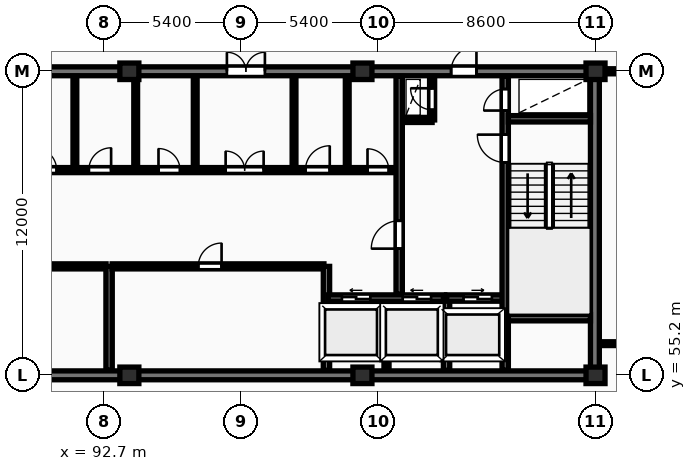
"""IFC4 building model, lengths in metres.
Left out: names, types, materials, properties, quantities, classifications, styles, units other than length and angle.
Written with IfcOpenShell. Run it as: python <this file> out.ifc"""

import sys

from ifc_helpers import new_model, si_unit, direction, frame, frame_2d, origin, origin_2d, place, context, subcontext, project, spatial, rectangle, extrude, element, fill, save


model = new_model("IFC4")
c1 = context("Model", 3, precision=1e-05, world=origin(), true_north=direction((0.0, 1.0)))
c2 = subcontext(c1, "Body", "Model", "MODEL_VIEW")
j1 = project(units=[si_unit("LENGTHUNIT", "METRE"), si_unit("PLANEANGLEUNIT", "RADIAN")], contexts=[c1])
p1 = place(None, origin())
s1 = spatial("IfcSite", under=j1, at=p1, CompositionType="ELEMENT")
p2 = place(p1, origin())
s2 = spatial("IfcBuilding", under=s1, at=p2, CompositionType="ELEMENT")
p3 = place(p2, frame((0.0, 0.0, 242.45)))
s3 = spatial("IfcBuildingStorey", under=s2, at=p3, CompositionType="ELEMENT", Elevation=242.45)
for number, where, z_axis, x_axis in (
    (1, (93.7, 55.2, 0.0), (0.0, 0.0, 1.0), (1.0, 0.0, 0.0)),
    (2, (93.7, 67.2, 0.0), (0.0, 0.0, 1.0), (1.0, 0.0, 0.0)),
    (3, (102.9, 55.2, 0.0), (0.0, 0.0, 1.0), (1.0, 0.0, 0.0)),
    (4, (102.9, 67.2, 0.0), (0.0, 0.0, 1.0), (1.0, 0.0, 0.0)),
    (5, (112.1, 55.2, 0.0), (0.0, 0.0, 1.0), (1.0, 0.0, 0.0)),
    (6, (112.1, 67.2, 0.0), (0.0, 0.0, 1.0), (1.0, 0.0, 0.0)),
):
    element("IfcColumn", number, at=place(p3, frame(where, z_axis=z_axis, x_axis=x_axis)), inside=s3, PredefinedType="COLUMN", context=c2, shape_type="SweptSolid", body=[
        extrude(rectangle(XDim=0.75, YDim=0.65, at=origin_2d()), origin(), (0.0, 0.0, 1.0), 3.45),
    ])
p4 = place(p3, frame((75.95, 55.2, 0.0), z_axis=(0.0, 0.0, 1.0), x_axis=(1.0, 0.0, 0.0)))
e7 = element("IfcWall", 7, at=p4, inside=s3, PredefinedType="SHEAR", context=c2, shape_type="SweptSolid", body=[
    extrude(rectangle(XDim=36.3, YDim=0.35, at=frame_2d((18.15, 0.0))), origin(), (0.0, 0.0, 1.0), 3.45),
])
p5 = place(p3, frame((112.075, 55.375, 0.0), z_axis=(0.0, 0.0, 1.0), x_axis=(0.0, 1.0, 0.0)))
e8 = element("IfcWall", 8, at=p5, inside=s3, PredefinedType="SHEAR", context=c2, shape_type="SweptSolid", body=[
    extrude(rectangle(XDim=11.65, YDim=0.35, at=frame_2d((5.825, 0.0))), origin(), (0.0, 0.0, 1.0), 3.45),
])
p6 = place(p3, frame((75.95, 67.2, 0.0), z_axis=(0.0, 0.0, 1.0), x_axis=(1.0, 0.0, 0.0)))
e9 = element("IfcWall", 9, at=p6, inside=s3, PredefinedType="SHEAR", context=c2, shape_type="SweptSolid", body=[
    extrude(rectangle(XDim=36.3, YDim=0.35, at=frame_2d((18.15, 0.0))), origin(), (0.0, 0.0, 1.0), 3.45),
])
p7 = place(p6, frame((5.25, 0.0, 0.0)))
e10 = element("IfcOpeningElement", 10, at=p7, cuts=e9, PredefinedType="OPENING", context=c2, shape_type="SweptSolid", body=[
    extrude(rectangle(XDim=1.0, YDim=2.15, at=frame_2d((0.5, 1.075))), frame((0.0, 0.185, 0.0), z_axis=(0.0, -1.0, 0.0), x_axis=(1.0, 0.0, 0.0)), (0.0, 0.0, 1.0), 0.37),
])
p8 = place(p6, frame((21.6, 0.0, 0.0)))
e11 = element("IfcOpeningElement", 11, at=p8, cuts=e9, PredefinedType="OPENING", context=c2, shape_type="SweptSolid", body=[
    extrude(rectangle(XDim=1.5, YDim=2.2, at=frame_2d((0.75, 1.1))), frame((0.0, 0.185, 0.0), z_axis=(0.0, -1.0, 0.0), x_axis=(1.0, 0.0, 0.0)), (0.0, 0.0, 1.0), 0.37),
])
p9 = place(p6, frame((30.45, 0.0, 0.0)))
e12 = element("IfcOpeningElement", 12, at=p9, cuts=e9, PredefinedType="OPENING", context=c2, shape_type="SweptSolid", body=[
    extrude(rectangle(XDim=1.0, YDim=2.15, at=frame_2d((0.5, 1.075))), frame((0.0, 0.185, 0.0), z_axis=(0.0, -1.0, 0.0), x_axis=(1.0, 0.0, 0.0)), (0.0, 0.0, 1.0), 0.37),
])
p10 = place(p3, frame((84.42, 59.5, 0.0), z_axis=(0.0, 0.0, 1.0), x_axis=(1.0, 0.0, 0.0)))
e13 = element("IfcWall", 13, at=p10, inside=s3, PredefinedType="PARTITIONING", context=c2, shape_type="SweptSolid", body=[
    extrude(rectangle(XDim=8.36, YDim=0.2, at=frame_2d((4.18, 0.0))), origin(), (0.0, 0.0, 1.0), 3.17),
])
p11 = place(p10, frame((3.4, 0.0, 0.0)))
e14 = element("IfcOpeningElement", 14, at=p11, cuts=e13, PredefinedType="OPENING", context=c2, shape_type="SweptSolid", body=[
    extrude(rectangle(XDim=0.92, YDim=2.08, at=frame_2d((0.46, 1.04))), frame((0.0, 0.11, 0.0), z_axis=(0.0, -1.0, 0.0), x_axis=(1.0, 0.0, 0.0)), (0.0, 0.0, 1.0), 0.22),
])
p12 = place(p3, frame((92.9, 55.4, 0.0), z_axis=(0.0, 0.0, 1.0), x_axis=(0.0, 1.0, 0.0)))
e15 = element("IfcWall", 15, at=p12, inside=s3, PredefinedType="SHEAR", context=c2, shape_type="SweptSolid", body=[
    extrude(rectangle(XDim=4.1, YDim=0.25, at=frame_2d((2.05, 0.0))), origin(), (0.0, 0.0, 1.0), 3.45),
])
p13 = place(p3, frame((93.02, 59.5, 0.0), z_axis=(0.0, 0.0, 1.0), x_axis=(1.0, 0.0, 0.0)))
e16 = element("IfcWall", 16, at=p13, inside=s3, PredefinedType="PARTITIONING", context=c2, shape_type="SweptSolid", body=[
    extrude(rectangle(XDim=8.36, YDim=0.2, at=frame_2d((4.18, 0.0))), origin(), (0.0, 0.0, 1.0), 3.17),
])
p14 = place(p13, frame((3.4, 0.0, 0.0)))
e17 = element("IfcOpeningElement", 17, at=p14, cuts=e16, PredefinedType="OPENING", context=c2, shape_type="SweptSolid", body=[
    extrude(rectangle(XDim=0.92, YDim=2.08, at=frame_2d((0.46, 1.04))), frame((0.0, 0.11, 0.0), z_axis=(0.0, -1.0, 0.0), x_axis=(1.0, 0.0, 0.0)), (0.0, 0.0, 1.0), 0.22),
])
p15 = place(p3, frame((101.48, 55.4, 0.0), z_axis=(0.0, 0.0, 1.0), x_axis=(0.0, 1.0, 0.0)))
e18 = element("IfcWall", 18, at=p15, inside=s3, PredefinedType="SHEAR", context=c2, shape_type="SweptSolid", body=[
    extrude(rectangle(XDim=4.1, YDim=0.25, at=frame_2d((2.05, 0.0))), origin(), (0.0, 0.0, 1.0), 3.45),
])
p16 = place(p3, frame((103.85, 55.4, 0.0), z_axis=(0.0, 0.0, 1.0), x_axis=(0.0, 1.0, 0.0)))
e19 = element("IfcWall", 19, at=p16, inside=s3, PredefinedType="PARTITIONING", context=c2, shape_type="SweptSolid", body=[
    extrude(rectangle(XDim=2.72, YDim=0.2, at=frame_2d((1.36, 0.0))), origin(), (0.0, 0.0, 1.0), 3.17),
])
p17 = place(p3, frame((101.55, 58.25, 0.0), z_axis=(0.0, 0.0, 1.0), x_axis=(1.0, 0.0, 0.0)))
e20 = element("IfcWall", 20, at=p17, inside=s3, PredefinedType="SHEAR", context=c2, shape_type="SweptSolid", body=[
    extrude(rectangle(XDim=4.6, YDim=0.25, at=frame_2d((2.3, 0.0))), origin(), (0.0, 0.0, 1.0), 3.45),
])
p18 = place(p17, frame((0.54, 0.0, 0.0)))
e21 = element("IfcOpeningElement", 21, at=p18, cuts=e20, PredefinedType="OPENING", context=c2, shape_type="SweptSolid", body=[
    extrude(rectangle(XDim=1.12, YDim=2.12, at=frame_2d((0.56, 1.06))), frame((0.0, 0.135, 0.0), z_axis=(0.0, -1.0, 0.0), x_axis=(1.0, 0.0, 0.0)), (0.0, 0.0, 1.0), 0.27),
])
p19 = place(p17, frame((2.94, 0.0, 0.0)))
e22 = element("IfcOpeningElement", 22, at=p19, cuts=e20, PredefinedType="OPENING", context=c2, shape_type="SweptSolid", body=[
    extrude(rectangle(XDim=1.12, YDim=2.12, at=frame_2d((0.56, 1.06))), frame((0.0, 0.135, 0.0), z_axis=(0.0, -1.0, 0.0), x_axis=(1.0, 0.0, 0.0)), (0.0, 0.0, 1.0), 0.27),
])
p20 = place(p3, frame((106.22, 55.4, 0.0), z_axis=(0.0, 0.0, 1.0), x_axis=(0.0, 1.0, 0.0)))
e23 = element("IfcWall", 23, at=p20, inside=s3, PredefinedType="SHEAR", context=c2, shape_type="SweptSolid", body=[
    extrude(rectangle(XDim=2.85, YDim=0.25, at=frame_2d((1.425, 0.0))), origin(), (0.0, 0.0, 1.0), 3.45),
])
p21 = place(p3, frame((106.22, 58.25, 0.0), z_axis=(0.0, 0.0, 1.0), x_axis=(1.0, 0.0, 0.0)))
e24 = element("IfcWall", 24, at=p21, inside=s3, PredefinedType="SHEAR", context=c2, shape_type="SweptSolid", body=[
    extrude(rectangle(XDim=2.46, YDim=0.25, at=frame_2d((1.23, 0.0))), origin(), (0.0, 0.0, 1.0), 3.45),
])
p22 = place(p21, frame((0.67, 0.0, 0.0)))
e25 = element("IfcOpeningElement", 25, at=p22, cuts=e24, PredefinedType="OPENING", context=c2, shape_type="SweptSolid", body=[
    extrude(rectangle(XDim=1.12, YDim=2.12, at=frame_2d((0.56, 1.06))), frame((0.0, 0.135, 0.0), z_axis=(0.0, -1.0, 0.0), x_axis=(1.0, 0.0, 0.0)), (0.0, 0.0, 1.0), 0.27),
])
p23 = place(p3, frame((91.55, 63.4, 0.0), z_axis=(0.0, 0.0, 1.0), x_axis=(0.0, 1.0, 0.0)))
e26 = element("IfcWall", 26, at=p23, inside=s3, PredefinedType="PARTITIONING", context=c2, shape_type="SweptSolid", body=[
    extrude(rectangle(XDim=3.6, YDim=0.15, at=frame_2d((1.8, 0.0))), origin(), (0.0, 0.0, 1.0), 3.17),
])
p24 = place(p3, frame((93.95, 63.4, 0.0), z_axis=(0.0, 0.0, 1.0), x_axis=(0.0, 1.0, 0.0)))
e27 = element("IfcWall", 27, at=p24, inside=s3, PredefinedType="PARTITIONING", context=c2, shape_type="SweptSolid", body=[
    extrude(rectangle(XDim=3.6, YDim=0.15, at=frame_2d((1.8, 0.0))), origin(), (0.0, 0.0, 1.0), 2.477),
])
for number, where, z_axis, x_axis in (
    (28, (102.3, 63.4, 0.0), (0.0, 0.0, 1.0), (0.0, 1.0, 0.0)),
    (29, (96.3, 63.4, 0.0), (0.0, 0.0, 1.0), (0.0, 1.0, 0.0)),
    (30, (100.2, 63.4, 0.0), (0.0, 0.0, 1.0), (0.0, 1.0, 0.0)),
):
    element("IfcWall", number, at=place(p3, frame(where, z_axis=z_axis, x_axis=x_axis)), inside=s3, PredefinedType="PARTITIONING", context=c2, shape_type="SweptSolid", body=[
        extrude(rectangle(XDim=3.6, YDim=0.15, at=frame_2d((1.8, 0.0))), origin(), (0.0, 0.0, 1.0), 3.17),
    ])
p25 = place(p3, frame((84.42, 63.3, 0.0), z_axis=(0.0, 0.0, 1.0), x_axis=(1.0, 0.0, 0.0)))
e31 = element("IfcWall", 31, at=p25, inside=s3, PredefinedType="PARTITIONING", context=c2, shape_type="SweptSolid", body=[
    extrude(rectangle(XDim=19.83, YDim=0.2, at=frame_2d((9.915, 0.0))), origin(), (0.0, 0.0, 1.0), 3.17),
])
p26 = place(p25, frame((1.15, 0.0, 0.0)))
e32 = element("IfcOpeningElement", 32, at=p26, cuts=e31, PredefinedType="OPENING", context=c2, shape_type="SweptSolid", body=[
    extrude(rectangle(XDim=0.85, YDim=2.05, at=frame_2d((0.425, 1.025))), frame((0.0, 0.11, 0.0), z_axis=(0.0, -1.0, 0.0), x_axis=(1.0, 0.0, 0.0)), (0.0, 0.0, 1.0), 0.22),
])
p27 = place(p25, frame((3.25, 0.0, 0.0)))
e33 = element("IfcOpeningElement", 33, at=p27, cuts=e31, PredefinedType="OPENING", context=c2, shape_type="SweptSolid", body=[
    extrude(rectangle(XDim=0.85, YDim=2.05, at=frame_2d((0.425, 1.025))), frame((0.0, 0.11, 0.0), z_axis=(0.0, -1.0, 0.0), x_axis=(1.0, 0.0, 0.0)), (0.0, 0.0, 1.0), 0.22),
])
p28 = place(p25, frame((13.08, 0.0, 0.0)))
e34 = element("IfcOpeningElement", 34, at=p28, cuts=e31, PredefinedType="OPENING", context=c2, shape_type="SweptSolid", body=[
    extrude(rectangle(XDim=1.5, YDim=2.2, at=frame_2d((0.75, 1.1))), frame((0.0, 0.11, 0.0), z_axis=(0.0, -1.0, 0.0), x_axis=(1.0, 0.0, 0.0)), (0.0, 0.0, 1.0), 0.22),
])
p29 = place(p25, frame((5.53, 0.0, 0.0)))
e35 = element("IfcOpeningElement", 35, at=p29, cuts=e31, PredefinedType="OPENING", context=c2, shape_type="SweptSolid", body=[
    extrude(rectangle(XDim=0.88, YDim=2.06, at=frame_2d((0.44, 1.03))), frame((0.0, 0.11, 0.0), z_axis=(0.0, -1.0, 0.0), x_axis=(1.0, 0.0, 0.0)), (0.0, 0.0, 1.0), 0.22),
])
p30 = place(p25, frame((7.68, 0.0, 0.0)))
e36 = element("IfcOpeningElement", 36, at=p30, cuts=e31, PredefinedType="OPENING", context=c2, shape_type="SweptSolid", body=[
    extrude(rectangle(XDim=0.88, YDim=2.06, at=frame_2d((0.44, 1.03))), frame((0.0, 0.11, 0.0), z_axis=(0.0, -1.0, 0.0), x_axis=(1.0, 0.0, 0.0)), (0.0, 0.0, 1.0), 0.22),
])
p31 = place(p25, frame((10.43, 0.0, 0.0)))
e37 = element("IfcOpeningElement", 37, at=p31, cuts=e31, PredefinedType="OPENING", context=c2, shape_type="SweptSolid", body=[
    extrude(rectangle(XDim=0.85, YDim=2.05, at=frame_2d((0.425, 1.025))), frame((0.0, 0.11, 0.0), z_axis=(0.0, -1.0, 0.0), x_axis=(1.0, 0.0, 0.0)), (0.0, 0.0, 1.0), 0.22),
])
p32 = place(p25, frame((16.23, 0.0, 0.0)))
e38 = element("IfcOpeningElement", 38, at=p32, cuts=e31, PredefinedType="OPENING", context=c2, shape_type="SweptSolid", body=[
    extrude(rectangle(XDim=0.96, YDim=2.1, at=frame_2d((0.48, 1.05))), frame((0.0, 0.11, 0.0), z_axis=(0.0, -1.0, 0.0), x_axis=(1.0, 0.0, 0.0)), (0.0, 0.0, 1.0), 0.22),
])
p33 = place(p25, frame((18.68, 0.0, 0.0)))
e39 = element("IfcOpeningElement", 39, at=p33, cuts=e31, PredefinedType="OPENING", context=c2, shape_type="SweptSolid", body=[
    extrude(rectangle(XDim=0.84, YDim=2.04, at=frame_2d((0.42, 1.02))), frame((0.0, 0.11, 0.0), z_axis=(0.0, -1.0, 0.0), x_axis=(1.0, 0.0, 0.0)), (0.0, 0.0, 1.0), 0.22),
])
p34 = place(p3, frame((104.45, 65.28, 0.0), z_axis=(0.0, 0.0, 1.0), x_axis=(1.0, 0.0, 0.0)))
e40 = element("IfcWall", 40, at=p34, inside=s3, PredefinedType="PARTITIONING", context=c2, shape_type="SweptSolid", body=[
    extrude(rectangle(XDim=1.2, YDim=0.2, at=frame_2d((0.6, 0.0))), origin(), (0.0, 0.0, 1.0), 3.17),
])
p35 = place(p3, frame((105.65, 65.28, 0.0), z_axis=(0.0, 0.0, 1.0), x_axis=(0.0, 1.0, 0.0)))
e41 = element("IfcWall", 41, at=p35, inside=s3, PredefinedType="PARTITIONING", context=c2, shape_type="SweptSolid", body=[
    extrude(rectangle(XDim=1.72, YDim=0.2, at=frame_2d((0.86, 0.0))), origin(), (0.0, 0.0, 1.0), 3.17),
])
p36 = place(p35, frame((0.4, 0.0, 0.0)))
e42 = element("IfcOpeningElement", 42, at=p36, cuts=e41, PredefinedType="OPENING", context=c2, shape_type="SweptSolid", body=[
    extrude(rectangle(XDim=0.85, YDim=2.05, at=frame_2d((0.425, 1.025))), frame((0.0, 0.11, 0.0), z_axis=(0.0, -1.0, 0.0), x_axis=(1.0, 0.0, 0.0)), (0.0, 0.0, 1.0), 0.22),
])
p37 = place(p3, frame((104.35, 58.4, 0.0), z_axis=(0.0, 0.0, 1.0), x_axis=(0.0, 1.0, 0.0)))
e43 = element("IfcWall", 43, at=p37, inside=s3, PredefinedType="SHEAR", context=c2, shape_type="SweptSolid", body=[
    extrude(rectangle(XDim=8.6, YDim=0.25, at=frame_2d((4.3, 0.0))), origin(), (0.0, 0.0, 1.0), 3.45),
])
p38 = place(p37, frame((1.8, 0.0, 0.0)))
e44 = element("IfcOpeningElement", 44, at=p38, cuts=e43, PredefinedType="OPENING", context=c2, shape_type="SweptSolid", body=[
    extrude(rectangle(XDim=1.1, YDim=2.1, at=frame_2d((0.55, 1.05))), frame((0.0, 0.135, 0.0), z_axis=(0.0, -1.0, 0.0), x_axis=(1.0, 0.0, 0.0)), (0.0, 0.0, 1.0), 0.27),
])
p39 = place(p3, frame((108.535, 55.4, 0.0), z_axis=(0.0, 0.0, 1.0), x_axis=(0.0, 1.0, 0.0)))
e45 = element("IfcWall", 45, at=p39, inside=s3, PredefinedType="SHEAR", context=c2, shape_type="SweptSolid", body=[
    extrude(rectangle(XDim=11.6, YDim=0.25, at=frame_2d((5.8, 0.0))), origin(), (0.0, 0.0, 1.0), 3.45),
])
p40 = place(p39, frame((8.2, 0.0, 0.0)))
e46 = element("IfcOpeningElement", 46, at=p40, cuts=e45, PredefinedType="OPENING", context=c2, shape_type="SweptSolid", body=[
    extrude(rectangle(XDim=1.1, YDim=2.1, at=frame_2d((0.55, 1.05))), frame((0.0, 0.135, 0.0), z_axis=(0.0, -1.0, 0.0), x_axis=(1.0, 0.0, 0.0)), (0.0, 0.0, 1.0), 0.27),
])
p41 = place(p39, frame((10.25, 0.0, 0.0)))
e47 = element("IfcOpeningElement", 47, at=p41, cuts=e45, PredefinedType="OPENING", context=c2, shape_type="SweptSolid", body=[
    extrude(rectangle(XDim=0.85, YDim=2.05, at=frame_2d((0.425, 1.025))), frame((0.0, 0.135, 0.0), z_axis=(0.0, -1.0, 0.0), x_axis=(1.0, 0.0, 0.0)), (0.0, 0.0, 1.0), 0.27),
])
for number, where, z_axis, x_axis in (
    (48, (108.66, 57.475, 0.0), (0.0, 0.0, 1.0), (1.0, 0.0, 0.0)),
    (49, (108.66, 65.325, 0.0), (0.0, 0.0, 1.0), (1.0, 0.0, 0.0)),
):
    element("IfcWall", number, at=place(p3, frame(where, z_axis=z_axis, x_axis=x_axis)), inside=s3, PredefinedType="SHEAR", context=c2, shape_type="SweptSolid", body=[
        extrude(rectangle(XDim=3.24, YDim=0.25, at=frame_2d((1.62, 0.0))), origin(), (0.0, 0.0, 1.0), 3.45),
    ])
p42 = place(p3, frame((112.27, 56.45, 0.0), z_axis=(0.0, 0.0, 1.0), x_axis=(1.0, 0.0, 0.0)))
e50 = element("IfcWall", 50, at=p42, inside=s3, PredefinedType="PARTITIONING", context=c2, shape_type="SweptSolid", body=[
    extrude(rectangle(XDim=6.76, YDim=0.15, at=frame_2d((3.38, 0.0))), origin(), (0.0, 0.0, 1.0), 3.17),
])
p43 = place(p42, frame((1.64, 0.0, 0.0)))
e51 = element("IfcOpeningElement", 51, at=p43, cuts=e50, PredefinedType="OPENING", context=c2, shape_type="SweptSolid", body=[
    extrude(rectangle(XDim=0.84, YDim=2.04, at=frame_2d((0.42, 1.02))), frame((0.0, 0.085, 0.0), z_axis=(0.0, -1.0, 0.0), x_axis=(1.0, 0.0, 0.0)), (0.0, 0.0, 1.0), 0.17),
])
p44 = place(p42, frame((3.16, 0.0, 0.0)))
e52 = element("IfcOpeningElement", 52, at=p44, cuts=e50, PredefinedType="OPENING", context=c2, shape_type="SweptSolid", body=[
    extrude(rectangle(XDim=0.88, YDim=2.06, at=frame_2d((0.44, 1.03))), frame((0.0, 0.085, 0.0), z_axis=(0.0, -1.0, 0.0), x_axis=(1.0, 0.0, 0.0)), (0.0, 0.0, 1.0), 0.17),
])
p45 = place(p3, frame((112.25, 67.2, 0.0), z_axis=(0.0, 0.0, 1.0), x_axis=(1.0, 0.0, 0.0)))
e53 = element("IfcWall", 53, at=p45, inside=s3, PredefinedType="PARTITIONING", context=c2, shape_type="SweptSolid", body=[
    extrude(rectangle(XDim=16.15, YDim=0.2, at=frame_2d((8.075, 0.0))), origin(), (0.0, 0.0, 1.0), 2.633),
])
p46 = place(p45, frame((1.58, 0.0, 0.0)))
e54 = element("IfcOpeningElement", 54, at=p46, cuts=e53, PredefinedType="OPENING", context=c2, shape_type="SweptSolid", body=[
    extrude(rectangle(XDim=0.95, YDim=2.15, at=frame_2d((0.475, 1.075))), frame((0.0, 0.11, 0.0), z_axis=(0.0, -1.0, 0.0), x_axis=(1.0, 0.0, 0.0)), (0.0, 0.0, 1.0), 0.22),
])
p47 = place(p8, origin())
e55 = element("IfcDoor", 55, at=p47, inside=s3, OperationType="DOUBLE_DOOR_SINGLE_SWING", PredefinedType="DOOR", context=c2, shape_type="SweptSolid", body=[
    extrude(rectangle(XDim=1.5, YDim=2.2, at=frame_2d((0.75, 1.1))), frame((0.0, 0.025, 0.0), z_axis=(0.0, -1.0, 0.0), x_axis=(1.0, 0.0, 0.0)), (0.0, 0.0, 1.0), 0.05),
])
fill(e11, e55)
p48 = place(p9, origin())
e56 = element("IfcDoor", 56, at=p48, inside=s3, OperationType="SINGLE_SWING_RIGHT", PredefinedType="DOOR", context=c2, shape_type="SweptSolid", body=[
    extrude(rectangle(XDim=1.0, YDim=2.15, at=frame_2d((0.5, 1.075))), frame((0.0, 0.025, 0.0), z_axis=(0.0, -1.0, 0.0), x_axis=(1.0, 0.0, 0.0)), (0.0, 0.0, 1.0), 0.05),
])
fill(e12, e56)
p49 = place(p14, origin())
e57 = element("IfcDoor", 57, at=p49, inside=s3, OperationType="SINGLE_SWING_RIGHT", PredefinedType="DOOR", context=c2, shape_type="SweptSolid", body=[
    extrude(rectangle(XDim=0.92, YDim=2.08, at=frame_2d((0.46, 1.04))), frame((0.0, 0.025, 0.0), z_axis=(0.0, -1.0, 0.0), x_axis=(1.0, 0.0, 0.0)), (0.0, 0.0, 1.0), 0.05),
])
fill(e17, e57)
p50 = place(p18, origin())
e58 = element("IfcDoor", 58, at=p50, inside=s3, OperationType="SLIDING_TO_LEFT", PredefinedType="DOOR", context=c2, shape_type="SweptSolid", body=[
    extrude(rectangle(XDim=1.12, YDim=2.12, at=frame_2d((0.56, 1.06))), frame((0.0, 0.025, 0.0), z_axis=(0.0, -1.0, 0.0), x_axis=(1.0, 0.0, 0.0)), (0.0, 0.0, 1.0), 0.05),
])
fill(e21, e58)
p51 = place(p19, origin())
e59 = element("IfcDoor", 59, at=p51, inside=s3, OperationType="SLIDING_TO_LEFT", PredefinedType="DOOR", context=c2, shape_type="SweptSolid", body=[
    extrude(rectangle(XDim=1.12, YDim=2.12, at=frame_2d((0.56, 1.06))), frame((0.0, 0.025, 0.0), z_axis=(0.0, -1.0, 0.0), x_axis=(1.0, 0.0, 0.0)), (0.0, 0.0, 1.0), 0.05),
])
fill(e22, e59)
p52 = place(p22, origin())
e60 = element("IfcDoor", 60, at=p52, inside=s3, OperationType="SLIDING_TO_RIGHT", PredefinedType="DOOR", context=c2, shape_type="SweptSolid", body=[
    extrude(rectangle(XDim=1.12, YDim=2.12, at=frame_2d((0.56, 1.06))), frame((0.0, 0.025, 0.0), z_axis=(0.0, -1.0, 0.0), x_axis=(1.0, 0.0, 0.0)), (0.0, 0.0, 1.0), 0.05),
])
fill(e25, e60)
p53 = place(p28, origin())
e61 = element("IfcDoor", 61, at=p53, inside=s3, OperationType="DOUBLE_DOOR_SINGLE_SWING", PredefinedType="DOOR", context=c2, shape_type="SweptSolid", body=[
    extrude(rectangle(XDim=1.5, YDim=2.2, at=frame_2d((0.75, 1.1))), frame((0.0, 0.025, 0.0), z_axis=(0.0, -1.0, 0.0), x_axis=(1.0, 0.0, 0.0)), (0.0, 0.0, 1.0), 0.05),
])
fill(e34, e61)
p54 = place(p29, origin())
e62 = element("IfcDoor", 62, at=p54, inside=s3, OperationType="SINGLE_SWING_LEFT", PredefinedType="DOOR", context=c2, shape_type="SweptSolid", body=[
    extrude(rectangle(XDim=0.88, YDim=2.06, at=frame_2d((0.44, 1.03))), frame((0.0, 0.025, 0.0), z_axis=(0.0, -1.0, 0.0), x_axis=(1.0, 0.0, 0.0)), (0.0, 0.0, 1.0), 0.05),
])
fill(e35, e62)
p55 = place(p30, origin())
e63 = element("IfcDoor", 63, at=p55, inside=s3, OperationType="SINGLE_SWING_RIGHT", PredefinedType="DOOR", context=c2, shape_type="SweptSolid", body=[
    extrude(rectangle(XDim=0.88, YDim=2.06, at=frame_2d((0.44, 1.03))), frame((0.0, 0.025, 0.0), z_axis=(0.0, -1.0, 0.0), x_axis=(1.0, 0.0, 0.0)), (0.0, 0.0, 1.0), 0.05),
])
fill(e36, e63)
p56 = place(p31, origin())
e64 = element("IfcDoor", 64, at=p56, inside=s3, OperationType="SINGLE_SWING_LEFT", PredefinedType="DOOR", context=c2, shape_type="SweptSolid", body=[
    extrude(rectangle(XDim=0.85, YDim=2.05, at=frame_2d((0.425, 1.025))), frame((0.0, 0.025, 0.0), z_axis=(0.0, -1.0, 0.0), x_axis=(1.0, 0.0, 0.0)), (0.0, 0.0, 1.0), 0.05),
])
fill(e37, e64)
p57 = place(p32, origin())
e65 = element("IfcDoor", 65, at=p57, inside=s3, OperationType="SINGLE_SWING_RIGHT", PredefinedType="DOOR", context=c2, shape_type="SweptSolid", body=[
    extrude(rectangle(XDim=0.96, YDim=2.1, at=frame_2d((0.48, 1.05))), frame((0.0, 0.025, 0.0), z_axis=(0.0, -1.0, 0.0), x_axis=(1.0, 0.0, 0.0)), (0.0, 0.0, 1.0), 0.05),
])
fill(e38, e65)
p58 = place(p33, origin())
e66 = element("IfcDoor", 66, at=p58, inside=s3, OperationType="SINGLE_SWING_LEFT", PredefinedType="DOOR", context=c2, shape_type="SweptSolid", body=[
    extrude(rectangle(XDim=0.84, YDim=2.04, at=frame_2d((0.42, 1.02))), frame((0.0, 0.025, 0.0), z_axis=(0.0, -1.0, 0.0), x_axis=(1.0, 0.0, 0.0)), (0.0, 0.0, 1.0), 0.05),
])
fill(e39, e66)
p59 = place(p36, origin())
e67 = element("IfcDoor", 67, at=p59, inside=s3, OperationType="SINGLE_SWING_RIGHT", PredefinedType="DOOR", context=c2, shape_type="SweptSolid", body=[
    extrude(rectangle(XDim=0.85, YDim=2.05, at=frame_2d((0.425, 1.025))), frame((0.0, 0.025, 0.0), z_axis=(0.0, -1.0, 0.0), x_axis=(1.0, 0.0, 0.0)), (0.0, 0.0, 1.0), 0.05),
])
fill(e42, e67)
p60 = place(p38, origin())
e68 = element("IfcDoor", 68, at=p60, inside=s3, OperationType="SINGLE_SWING_LEFT", PredefinedType="DOOR", context=c2, shape_type="SweptSolid", body=[
    extrude(rectangle(XDim=1.1, YDim=2.1, at=frame_2d((0.55, 1.05))), frame((0.0, 0.025, 0.0), z_axis=(0.0, -1.0, 0.0), x_axis=(1.0, 0.0, 0.0)), (0.0, 0.0, 1.0), 0.05),
])
fill(e44, e68)
p61 = place(p40, origin())
e69 = element("IfcDoor", 69, at=p61, inside=s3, OperationType="SINGLE_SWING_RIGHT", PredefinedType="DOOR", context=c2, shape_type="SweptSolid", body=[
    extrude(rectangle(XDim=1.1, YDim=2.1, at=frame_2d((0.55, 1.05))), frame((0.0, 0.025, 0.0), z_axis=(0.0, -1.0, 0.0), x_axis=(1.0, 0.0, 0.0)), (0.0, 0.0, 1.0), 0.05),
])
fill(e46, e69)
p62 = place(p41, origin())
e70 = element("IfcDoor", 70, at=p62, inside=s3, OperationType="SINGLE_SWING_LEFT", PredefinedType="DOOR", context=c2, shape_type="SweptSolid", body=[
    extrude(rectangle(XDim=0.85, YDim=2.05, at=frame_2d((0.425, 1.025))), frame((0.0, 0.025, 0.0), z_axis=(0.0, -1.0, 0.0), x_axis=(1.0, 0.0, 0.0)), (0.0, 0.0, 1.0), 0.05),
])
fill(e47, e70)
save(model, sys.argv[1])
